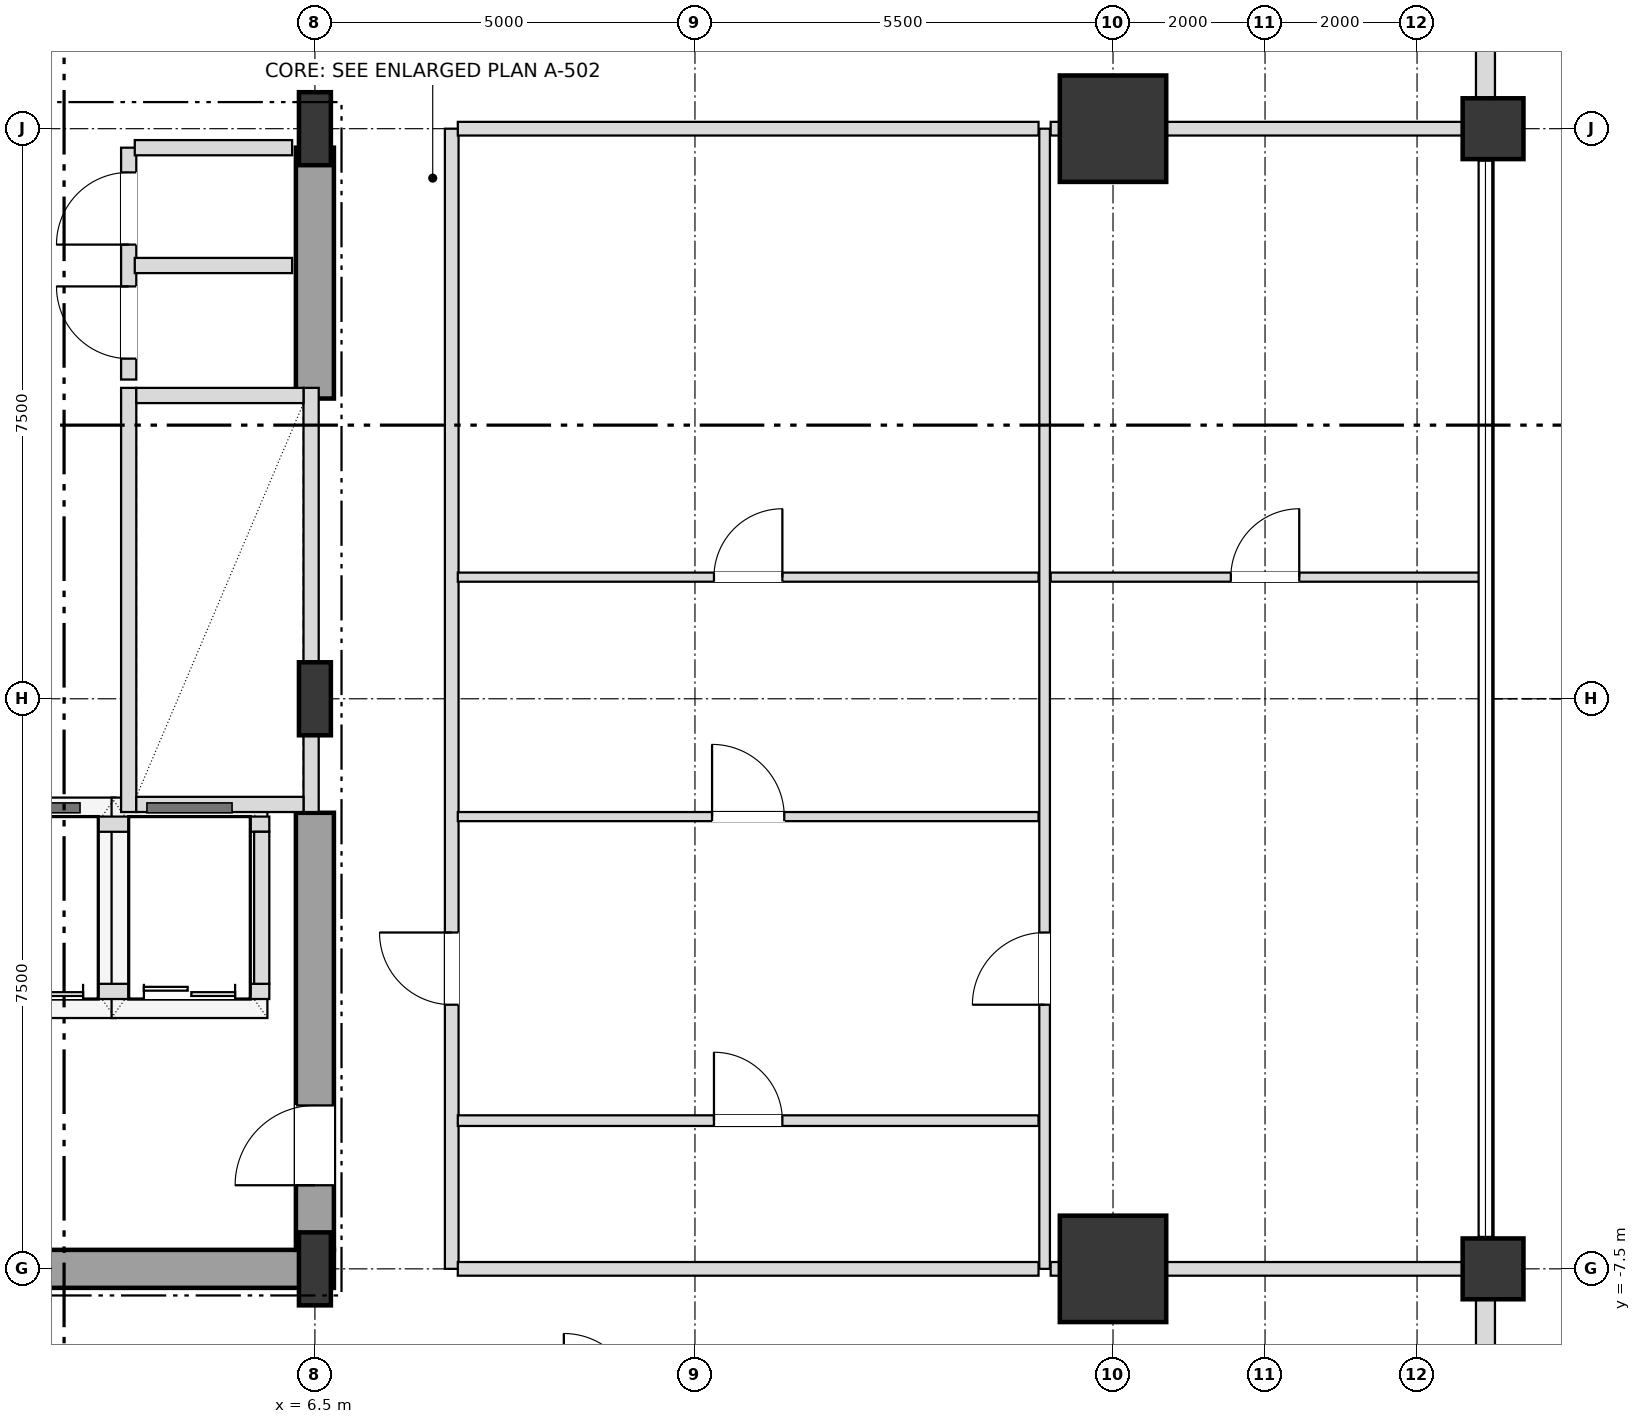
"""IFC4 building model, lengths in metres.
Left out: names, types, materials, properties, quantities, classifications, styles, units other than length and angle.
Written with IfcOpenShell. Run it as: python <this file> out.ifc"""

import sys

from ifc_helpers import new_model, si_unit, direction, frame, frame_2d, origin, origin_2d, place, context, subcontext, project, spatial, rectangle, i_section, extrude, element, fill, save


model = new_model("IFC4")
c1 = context("Model", 3, precision=1e-05, world=origin(), true_north=direction((0.0, 1.0)))
c2 = subcontext(c1, "Body", "Model", "MODEL_VIEW")
j1 = project(units=[si_unit("LENGTHUNIT", "METRE"), si_unit("PLANEANGLEUNIT", "RADIAN")], contexts=[c1])
p1 = place(None, origin())
s1 = spatial("IfcSite", under=j1, at=p1, CompositionType="ELEMENT")
p2 = place(p1, origin())
s2 = spatial("IfcBuilding", under=s1, at=p2, CompositionType="ELEMENT")
p3 = place(p2, frame((0.0, 0.0, 39.6)))
s3 = spatial("IfcBuildingStorey", under=s2, at=p3, CompositionType="ELEMENT", Elevation=39.6)
for number, where, z_axis, x_axis in (
    (1, (6.5, -7.5, 0.0), (0.0, 0.0, 1.0), (1.0, 0.0, 0.0)),
    (2, (6.5, 0.0, 0.0), (0.0, 0.0, 1.0), (1.0, 0.0, 0.0)),
    (3, (6.5, 7.5, 0.0), (0.0, 0.0, 1.0), (1.0, 0.0, 0.0)),
):
    element("IfcColumn", number, at=place(p3, frame(where, z_axis=z_axis, x_axis=x_axis)), inside=s3, PredefinedType="COLUMN", context=c2, shape_type="SweptSolid", body=[
        extrude(i_section(OverallWidth=0.42, OverallDepth=0.96, WebThickness=0.022, FlangeThickness=0.034, at=origin_2d()), origin(), (0.0, 0.0, 1.0), 3.6),
    ])
for number, where, z_axis, x_axis in (
    (4, (17.0, -7.5, 0.0), (0.0, 0.0, 1.0), (1.0, 0.0, 0.0)),
    (5, (17.0, 7.5, 0.0), (0.0, 0.0, 1.0), (1.0, 0.0, 0.0)),
):
    element("IfcColumn", number, at=place(p3, frame(where, z_axis=z_axis, x_axis=x_axis)), inside=s3, PredefinedType="USERDEFINED", context=c2, shape_type="SweptSolid", body=[
        extrude(rectangle(XDim=1.4, YDim=1.4, at=origin_2d()), origin(), (0.0, 0.0, 1.0), 3.6),
    ])
for number, where, z_axis, x_axis in (
    (6, (22.0, -7.5, 0.0), (0.0, 0.0, 1.0), (1.0, 0.0, 0.0)),
    (7, (22.0, 7.5, 0.0), (0.0, 0.0, 1.0), (1.0, 0.0, 0.0)),
):
    element("IfcColumn", number, at=place(p3, frame(where, z_axis=z_axis, x_axis=x_axis)), inside=s3, PredefinedType="COLUMN", context=c2, shape_type="SweptSolid", body=[
        extrude(rectangle(XDim=0.8, YDim=0.8, at=origin_2d()), origin(), (0.0, 0.0, 1.0), 3.6),
    ])
p4 = place(p3, frame((21.9, -12.605, 0.0), z_axis=(0.0, 0.0, 1.0), x_axis=(0.0, 1.0, 0.0)))
e8 = element("IfcWall", 8, at=p4, inside=s3, PredefinedType="SOLIDWALL", context=c2, shape_type="SweptSolid", body=[
    extrude(rectangle(XDim=4.71, YDim=0.25, at=frame_2d((2.355, 0.0))), origin(), (0.0, 0.0, 1.0), 2.736),
])
p5 = place(p4, frame((1.455, 0.0, 0.72)))
e9 = element("IfcOpeningElement", 9, at=p5, cuts=e8, PredefinedType="OPENING", context=c2, shape_type="SweptSolid", body=[
    extrude(rectangle(XDim=1.8, YDim=1.68, at=frame_2d((0.9, 0.84))), frame((0.0, 0.135, 0.0), z_axis=(0.0, -1.0, 0.0), x_axis=(1.0, 0.0, 0.0)), (0.0, 0.0, 1.0), 0.27),
])
p6 = place(p3, frame((21.9, 7.895, 0.0), z_axis=(0.0, 0.0, 1.0), x_axis=(0.0, 1.0, 0.0)))
e10 = element("IfcWall", 10, at=p6, inside=s3, PredefinedType="SOLIDWALL", context=c2, shape_type="SweptSolid", body=[
    extrude(rectangle(XDim=4.71, YDim=0.25, at=frame_2d((2.355, 0.0))), origin(), (0.0, 0.0, 1.0), 2.736),
])
p7 = place(p6, frame((1.455, 0.0, 0.72)))
e11 = element("IfcOpeningElement", 11, at=p7, cuts=e10, PredefinedType="OPENING", context=c2, shape_type="SweptSolid", body=[
    extrude(rectangle(XDim=1.8, YDim=1.68, at=frame_2d((0.9, 0.84))), frame((0.0, 0.135, 0.0), z_axis=(0.0, -1.0, 0.0), x_axis=(1.0, 0.0, 0.0)), (0.0, 0.0, 1.0), 0.27),
])
p8 = place(p3, frame((0.0, -7.5, 0.0), z_axis=(0.0, 0.0, 1.0), x_axis=(1.0, 0.0, 0.0)))
e12 = element("IfcWall", 12, at=p8, inside=s3, PredefinedType="SHEAR", context=c2, shape_type="SweptSolid", body=[
    extrude(rectangle(XDim=6.75, YDim=0.5, at=frame_2d((3.375, 0.0))), origin(), (0.0, 0.0, 1.0), 3.38),
])
p9 = place(p3, frame((6.5, -7.25, 0.0), z_axis=(0.0, 0.0, 1.0), x_axis=(0.0, 1.0, 0.0)))
e13 = element("IfcWall", 13, at=p9, inside=s3, PredefinedType="SHEAR", context=c2, shape_type="SweptSolid", body=[
    extrude(rectangle(XDim=5.75, YDim=0.5, at=frame_2d((2.875, 0.0))), origin(), (0.0, 0.0, 1.0), 3.38),
])
p10 = place(p9, frame((0.85, 0.0, 0.0)))
e14 = element("IfcOpeningElement", 14, at=p10, cuts=e13, PredefinedType="OPENING", context=c2, shape_type="SweptSolid", body=[
    extrude(rectangle(XDim=1.05, YDim=2.15, at=frame_2d((0.525, 1.075))), frame((0.0, 0.26, 0.0), z_axis=(0.0, -1.0, 0.0), x_axis=(1.0, 0.0, 0.0)), (0.0, 0.0, 1.0), 0.52),
])
p11 = place(p3, frame((6.5, 3.95, 0.0), z_axis=(0.0, 0.0, 1.0), x_axis=(0.0, 1.0, 0.0)))
e15 = element("IfcWall", 15, at=p11, inside=s3, PredefinedType="SHEAR", context=c2, shape_type="SweptSolid", body=[
    extrude(rectangle(XDim=3.3, YDim=0.5, at=frame_2d((1.65, 0.0))), origin(), (0.0, 0.0, 1.0), 3.38),
])
p12 = place(p3, frame((4.05, -1.49, 0.0), z_axis=(0.0, 0.0, 1.0), x_axis=(0.0, 1.0, 0.0)))
e16 = element("IfcWall", 16, at=p12, inside=s3, PredefinedType="SOLIDWALL", context=c2, shape_type="SweptSolid", body=[
    extrude(rectangle(XDim=5.58, YDim=0.2, at=frame_2d((2.79, 0.0))), origin(), (0.0, 0.0, 1.0), 3.38),
])
p13 = place(p3, frame((6.45, -1.49, 0.0), z_axis=(0.0, 0.0, 1.0), x_axis=(0.0, 1.0, 0.0)))
e17 = element("IfcWall", 17, at=p13, inside=s3, PredefinedType="SOLIDWALL", context=c2, shape_type="SweptSolid", body=[
    extrude(rectangle(XDim=5.58, YDim=0.2, at=frame_2d((2.79, 0.0))), origin(), (0.0, 0.0, 1.0), 2.816),
])
for number, where, z_axis, x_axis in (
    (18, (4.15, -1.39, 0.0), (0.0, 0.0, 1.0), (1.0, 0.0, 0.0)),
    (19, (4.15, 3.99, 0.0), (0.0, 0.0, 1.0), (1.0, 0.0, 0.0)),
):
    element("IfcWall", number, at=place(p3, frame(where, z_axis=z_axis, x_axis=x_axis)), inside=s3, PredefinedType="SOLIDWALL", context=c2, shape_type="SweptSolid", body=[
        extrude(rectangle(XDim=2.2, YDim=0.2, at=frame_2d((1.1, 0.0))), origin(), (0.0, 0.0, 1.0), 3.38),
    ])
p14 = place(p3, frame((1.8, -3.85, 0.0), z_axis=(0.0, 0.0, 1.0), x_axis=(1.0, 0.0, 0.0)))
e20 = element("IfcWall", 20, at=p14, inside=s3, PredefinedType="SOLIDWALL", context=c2, shape_type="SweptSolid", body=[
    extrude(rectangle(XDim=4.1, YDim=0.2, at=frame_2d((2.05, 0.0))), origin(), (0.0, 0.0, 1.0), 3.38),
])
p15 = place(p14, frame((0.45, 0.0, 0.0)))
e21 = element("IfcOpeningElement", 21, at=p15, cuts=e20, PredefinedType="OPENING", context=c2, shape_type="SweptSolid", body=[
    extrude(rectangle(XDim=1.2, YDim=2.2, at=frame_2d((0.6, 1.1))), frame((0.0, 0.11, 0.0), z_axis=(0.0, -1.0, 0.0), x_axis=(1.0, 0.0, 0.0)), (0.0, 0.0, 1.0), 0.22),
])
p16 = place(p14, frame((2.45, 0.0, 0.0)))
e22 = element("IfcOpeningElement", 22, at=p16, cuts=e20, PredefinedType="OPENING", context=c2, shape_type="SweptSolid", body=[
    extrude(rectangle(XDim=1.2, YDim=2.2, at=frame_2d((0.6, 1.1))), frame((0.0, 0.11, 0.0), z_axis=(0.0, -1.0, 0.0), x_axis=(1.0, 0.0, 0.0)), (0.0, 0.0, 1.0), 0.22),
])
p17 = place(p3, frame((1.8, -1.65, 0.0), z_axis=(0.0, 0.0, 1.0), x_axis=(1.0, 0.0, 0.0)))
e23 = element("IfcWall", 23, at=p17, inside=s3, PredefinedType="SOLIDWALL", context=c2, shape_type="SweptSolid", body=[
    extrude(rectangle(XDim=4.1, YDim=0.2, at=frame_2d((2.05, 0.0))), origin(), (0.0, 0.0, 1.0), 3.38),
])
p18 = place(p3, frame((5.8, -3.75, 0.0), z_axis=(0.0, 0.0, 1.0), x_axis=(0.0, 1.0, 0.0)))
e24 = element("IfcWall", 24, at=p18, inside=s3, PredefinedType="SOLIDWALL", context=c2, shape_type="SweptSolid", body=[
    extrude(rectangle(XDim=2.0, YDim=0.2, at=frame_2d((1.0, 0.0))), origin(), (0.0, 0.0, 1.0), 3.38),
])
p19 = place(p3, frame((4.05, 4.2, 0.0), z_axis=(0.0, 0.0, 1.0), x_axis=(0.0, 1.0, 0.0)))
e25 = element("IfcWall", 25, at=p19, inside=s3, PredefinedType="SOLIDWALL", context=c2, shape_type="SweptSolid", body=[
    extrude(rectangle(XDim=3.05, YDim=0.2, at=frame_2d((1.525, 0.0))), origin(), (0.0, 0.0, 1.0), 3.38),
])
p20 = place(p19, frame((0.275, 0.0, 0.0)))
e26 = element("IfcOpeningElement", 26, at=p20, cuts=e25, PredefinedType="OPENING", context=c2, shape_type="SweptSolid", body=[
    extrude(rectangle(XDim=0.95, YDim=2.15, at=frame_2d((0.475, 1.075))), frame((0.0, 0.11, 0.0), z_axis=(0.0, -1.0, 0.0), x_axis=(1.0, 0.0, 0.0)), (0.0, 0.0, 1.0), 0.22),
])
p21 = place(p19, frame((1.775, 0.0, 0.0)))
e27 = element("IfcOpeningElement", 27, at=p21, cuts=e25, PredefinedType="OPENING", context=c2, shape_type="SweptSolid", body=[
    extrude(rectangle(XDim=0.95, YDim=2.15, at=frame_2d((0.475, 1.075))), frame((0.0, 0.11, 0.0), z_axis=(0.0, -1.0, 0.0), x_axis=(1.0, 0.0, 0.0)), (0.0, 0.0, 1.0), 0.22),
])
p22 = place(p3, frame((8.3, -7.5, 0.0), z_axis=(0.0, 0.0, 1.0), x_axis=(0.0, 1.0, 0.0)))
e28 = element("IfcWall", 28, at=p22, inside=s3, PredefinedType="PARTITIONING", context=c2, shape_type="SweptSolid", body=[
    extrude(rectangle(XDim=15.0, YDim=0.18, at=frame_2d((7.5, 0.0))), origin(), (0.0, 0.0, 1.0), 3.38),
])
p23 = place(p22, frame((3.475, 0.0, 0.0)))
e29 = element("IfcOpeningElement", 29, at=p23, cuts=e28, PredefinedType="OPENING", context=c2, shape_type="SweptSolid", body=[
    extrude(rectangle(XDim=0.95, YDim=2.15, at=frame_2d((0.475, 1.075))), frame((0.0, 0.1, 0.0), z_axis=(0.0, -1.0, 0.0), x_axis=(1.0, 0.0, 0.0)), (0.0, 0.0, 1.0), 0.2),
])
p24 = place(p3, frame((16.1, -7.5, 0.0), z_axis=(0.0, 0.0, 1.0), x_axis=(0.0, 1.0, 0.0)))
e30 = element("IfcWall", 30, at=p24, inside=s3, PredefinedType="PARTITIONING", context=c2, shape_type="SweptSolid", body=[
    extrude(rectangle(XDim=15.0, YDim=0.14, at=frame_2d((7.5, 0.0))), origin(), (0.0, 0.0, 1.0), 3.38),
])
p25 = place(p24, frame((3.475, 0.0, 0.0)))
e31 = element("IfcOpeningElement", 31, at=p25, cuts=e30, PredefinedType="OPENING", context=c2, shape_type="SweptSolid", body=[
    extrude(rectangle(XDim=0.95, YDim=2.1, at=frame_2d((0.475, 1.05))), frame((0.0, 0.08, 0.0), z_axis=(0.0, -1.0, 0.0), x_axis=(1.0, 0.0, 0.0)), (0.0, 0.0, 1.0), 0.16),
])
p26 = place(p3, frame((8.38, -7.5, 0.0), z_axis=(0.0, 0.0, 1.0), x_axis=(1.0, 0.0, 0.0)))
e32 = element("IfcWall", 32, at=p26, inside=s3, PredefinedType="PARTITIONING", context=c2, shape_type="SweptSolid", body=[
    extrude(rectangle(XDim=7.64, YDim=0.18, at=frame_2d((3.82, 0.0))), origin(), (0.0, 0.0, 1.0), 2.816),
])
p27 = place(p3, frame((16.18, -7.5, 0.0), z_axis=(0.0, 0.0, 1.0), x_axis=(1.0, 0.0, 0.0)))
e33 = element("IfcWall", 33, at=p27, inside=s3, PredefinedType="PARTITIONING", context=c2, shape_type="SweptSolid", body=[
    extrude(rectangle(XDim=5.72, YDim=0.18, at=frame_2d((2.86, 0.0))), origin(), (0.0, 0.0, 1.0), 2.816),
])
p28 = place(p3, frame((8.38, -5.55, 0.0), z_axis=(0.0, 0.0, 1.0), x_axis=(1.0, 0.0, 0.0)))
e34 = element("IfcWall", 34, at=p28, inside=s3, PredefinedType="PARTITIONING", context=c2, shape_type="SweptSolid", body=[
    extrude(rectangle(XDim=7.64, YDim=0.14, at=frame_2d((3.82, 0.0))), origin(), (0.0, 0.0, 1.0), 2.948),
])
p29 = place(p28, frame((3.37, 0.0, 0.0)))
e35 = element("IfcOpeningElement", 35, at=p29, cuts=e34, PredefinedType="OPENING", context=c2, shape_type="SweptSolid", body=[
    extrude(rectangle(XDim=0.9, YDim=2.1, at=frame_2d((0.45, 1.05))), frame((0.0, 0.08, 0.0), z_axis=(0.0, -1.0, 0.0), x_axis=(1.0, 0.0, 0.0)), (0.0, 0.0, 1.0), 0.16),
])
p30 = place(p3, frame((8.38, -1.55, 0.0), z_axis=(0.0, 0.0, 1.0), x_axis=(1.0, 0.0, 0.0)))
e36 = element("IfcWall", 36, at=p30, inside=s3, PredefinedType="PARTITIONING", context=c2, shape_type="SweptSolid", body=[
    extrude(rectangle(XDim=7.64, YDim=0.12, at=frame_2d((3.82, 0.0))), origin(), (0.0, 0.0, 1.0), 2.948),
])
p31 = place(p30, frame((3.345, 0.0, 0.0)))
e37 = element("IfcOpeningElement", 37, at=p31, cuts=e36, PredefinedType="OPENING", context=c2, shape_type="SweptSolid", body=[
    extrude(rectangle(XDim=0.95, YDim=2.1, at=frame_2d((0.475, 1.05))), frame((0.0, 0.07, 0.0), z_axis=(0.0, -1.0, 0.0), x_axis=(1.0, 0.0, 0.0)), (0.0, 0.0, 1.0), 0.14),
])
p32 = place(p3, frame((8.38, 1.6, 0.0), z_axis=(0.0, 0.0, 1.0), x_axis=(1.0, 0.0, 0.0)))
e38 = element("IfcWall", 38, at=p32, inside=s3, PredefinedType="PARTITIONING", context=c2, shape_type="SweptSolid", body=[
    extrude(rectangle(XDim=7.64, YDim=0.12, at=frame_2d((3.82, 0.0))), origin(), (0.0, 0.0, 1.0), 2.948),
])
p33 = place(p32, frame((3.37, 0.0, 0.0)))
e39 = element("IfcOpeningElement", 39, at=p33, cuts=e38, PredefinedType="OPENING", context=c2, shape_type="SweptSolid", body=[
    extrude(rectangle(XDim=0.9, YDim=2.1, at=frame_2d((0.45, 1.05))), frame((0.0, 0.07, 0.0), z_axis=(0.0, -1.0, 0.0), x_axis=(1.0, 0.0, 0.0)), (0.0, 0.0, 1.0), 0.14),
])
p34 = place(p3, frame((16.18, 1.6, 0.0), z_axis=(0.0, 0.0, 1.0), x_axis=(1.0, 0.0, 0.0)))
e40 = element("IfcWall", 40, at=p34, inside=s3, PredefinedType="PARTITIONING", context=c2, shape_type="SweptSolid", body=[
    extrude(rectangle(XDim=5.64, YDim=0.12, at=frame_2d((2.82, 0.0))), origin(), (0.0, 0.0, 1.0), 2.816),
])
p35 = place(p34, frame((2.37, 0.0, 0.0)))
e41 = element("IfcOpeningElement", 41, at=p35, cuts=e40, PredefinedType="OPENING", context=c2, shape_type="SweptSolid", body=[
    extrude(rectangle(XDim=0.9, YDim=2.1, at=frame_2d((0.45, 1.05))), frame((0.0, 0.07, 0.0), z_axis=(0.0, -1.0, 0.0), x_axis=(1.0, 0.0, 0.0)), (0.0, 0.0, 1.0), 0.14),
])
for number, where, z_axis, x_axis in (
    (42, (4.13, 5.7, 0.0), (0.0, 0.0, 1.0), (1.0, 0.0, 0.0)),
    (43, (4.13, 7.25, 0.0), (0.0, 0.0, 1.0), (1.0, 0.0, 0.0)),
):
    element("IfcWall", number, at=place(p3, frame(where, z_axis=z_axis, x_axis=x_axis)), inside=s3, PredefinedType="SOLIDWALL", context=c2, shape_type="SweptSolid", body=[
        extrude(rectangle(XDim=2.07, YDim=0.2, at=frame_2d((1.035, 0.0))), origin(), (0.0, 0.0, 1.0), 3.38),
    ])
p36 = place(p3, frame((8.38, 7.5, 0.0), z_axis=(0.0, 0.0, 1.0), x_axis=(1.0, 0.0, 0.0)))
e44 = element("IfcWall", 44, at=p36, inside=s3, PredefinedType="PARTITIONING", context=c2, shape_type="SweptSolid", body=[
    extrude(rectangle(XDim=7.64, YDim=0.18, at=frame_2d((3.82, 0.0))), origin(), (0.0, 0.0, 1.0), 2.816),
])
p37 = place(p3, frame((16.18, 7.5, 0.0), z_axis=(0.0, 0.0, 1.0), x_axis=(1.0, 0.0, 0.0)))
e45 = element("IfcWall", 45, at=p37, inside=s3, PredefinedType="PARTITIONING", context=c2, shape_type="SweptSolid", body=[
    extrude(rectangle(XDim=5.72, YDim=0.18, at=frame_2d((2.86, 0.0))), origin(), (0.0, 0.0, 1.0), 2.816),
])
p38 = place(p10, origin())
e46 = element("IfcDoor", 46, at=p38, inside=s3, OperationType="SINGLE_SWING_LEFT", PredefinedType="DOOR", context=c2, shape_type="SweptSolid", body=[
    extrude(rectangle(XDim=1.05, YDim=2.15, at=frame_2d((0.525, 1.075))), frame((0.0, 0.025, 0.0), z_axis=(0.0, -1.0, 0.0), x_axis=(1.0, 0.0, 0.0)), (0.0, 0.0, 1.0), 0.05),
])
fill(e14, e46)
p39 = place(p15, origin())
e47 = element("IfcDoor", 47, at=p39, inside=s3, OperationType="DOUBLE_DOOR_SLIDING", PredefinedType="DOOR", context=c2, shape_type="SweptSolid", body=[
    extrude(rectangle(XDim=1.2, YDim=2.2, at=frame_2d((0.6, 1.1))), frame((0.0, 0.025, 0.0), z_axis=(0.0, -1.0, 0.0), x_axis=(1.0, 0.0, 0.0)), (0.0, 0.0, 1.0), 0.05),
])
fill(e21, e47)
p40 = place(p16, origin())
e48 = element("IfcDoor", 48, at=p40, inside=s3, OperationType="DOUBLE_DOOR_SLIDING", PredefinedType="DOOR", context=c2, shape_type="SweptSolid", body=[
    extrude(rectangle(XDim=1.2, YDim=2.2, at=frame_2d((0.6, 1.1))), frame((0.0, 0.025, 0.0), z_axis=(0.0, -1.0, 0.0), x_axis=(1.0, 0.0, 0.0)), (0.0, 0.0, 1.0), 0.05),
])
fill(e22, e48)
p41 = place(p20, origin())
e49 = element("IfcDoor", 49, at=p41, inside=s3, OperationType="SINGLE_SWING_RIGHT", PredefinedType="DOOR", context=c2, shape_type="SweptSolid", body=[
    extrude(rectangle(XDim=0.95, YDim=2.15, at=frame_2d((0.475, 1.075))), frame((0.0, 0.025, 0.0), z_axis=(0.0, -1.0, 0.0), x_axis=(1.0, 0.0, 0.0)), (0.0, 0.0, 1.0), 0.05),
])
fill(e26, e49)
p42 = place(p21, origin())
e50 = element("IfcDoor", 50, at=p42, inside=s3, OperationType="SINGLE_SWING_LEFT", PredefinedType="DOOR", context=c2, shape_type="SweptSolid", body=[
    extrude(rectangle(XDim=0.95, YDim=2.15, at=frame_2d((0.475, 1.075))), frame((0.0, 0.025, 0.0), z_axis=(0.0, -1.0, 0.0), x_axis=(1.0, 0.0, 0.0)), (0.0, 0.0, 1.0), 0.05),
])
fill(e27, e50)
p43 = place(p29, origin())
e51 = element("IfcDoor", 51, at=p43, inside=s3, OperationType="SINGLE_SWING_LEFT", PredefinedType="DOOR", context=c2, shape_type="SweptSolid", body=[
    extrude(rectangle(XDim=0.9, YDim=2.1, at=frame_2d((0.45, 1.05))), frame((0.0, 0.025, 0.0), z_axis=(0.0, -1.0, 0.0), x_axis=(1.0, 0.0, 0.0)), (0.0, 0.0, 1.0), 0.05),
])
fill(e35, e51)
p44 = place(p23, origin())
e52 = element("IfcDoor", 52, at=p44, inside=s3, OperationType="SINGLE_SWING_RIGHT", PredefinedType="DOOR", context=c2, shape_type="SweptSolid", body=[
    extrude(rectangle(XDim=0.95, YDim=2.15, at=frame_2d((0.475, 1.075))), frame((0.0, 0.025, 0.0), z_axis=(0.0, -1.0, 0.0), x_axis=(1.0, 0.0, 0.0)), (0.0, 0.0, 1.0), 0.05),
])
fill(e29, e52)
p45 = place(p31, origin())
e53 = element("IfcDoor", 53, at=p45, inside=s3, OperationType="SINGLE_SWING_LEFT", PredefinedType="DOOR", context=c2, shape_type="SweptSolid", body=[
    extrude(rectangle(XDim=0.95, YDim=2.1, at=frame_2d((0.475, 1.05))), frame((0.0, 0.025, 0.0), z_axis=(0.0, -1.0, 0.0), x_axis=(1.0, 0.0, 0.0)), (0.0, 0.0, 1.0), 0.05),
])
fill(e37, e53)
p46 = place(p33, origin())
e54 = element("IfcDoor", 54, at=p46, inside=s3, OperationType="SINGLE_SWING_RIGHT", PredefinedType="DOOR", context=c2, shape_type="SweptSolid", body=[
    extrude(rectangle(XDim=0.9, YDim=2.1, at=frame_2d((0.45, 1.05))), frame((0.0, 0.025, 0.0), z_axis=(0.0, -1.0, 0.0), x_axis=(1.0, 0.0, 0.0)), (0.0, 0.0, 1.0), 0.05),
])
fill(e39, e54)
p47 = place(p25, origin())
e55 = element("IfcDoor", 55, at=p47, inside=s3, OperationType="SINGLE_SWING_LEFT", PredefinedType="DOOR", context=c2, shape_type="SweptSolid", body=[
    extrude(rectangle(XDim=0.95, YDim=2.1, at=frame_2d((0.475, 1.05))), frame((0.0, 0.025, 0.0), z_axis=(0.0, -1.0, 0.0), x_axis=(1.0, 0.0, 0.0)), (0.0, 0.0, 1.0), 0.05),
])
fill(e31, e55)
p48 = place(p35, origin())
e56 = element("IfcDoor", 56, at=p48, inside=s3, OperationType="SINGLE_SWING_RIGHT", PredefinedType="DOOR", context=c2, shape_type="SweptSolid", body=[
    extrude(rectangle(XDim=0.9, YDim=2.1, at=frame_2d((0.45, 1.05))), frame((0.0, 0.025, 0.0), z_axis=(0.0, -1.0, 0.0), x_axis=(1.0, 0.0, 0.0)), (0.0, 0.0, 1.0), 0.05),
])
fill(e41, e56)
save(model, sys.argv[1])
